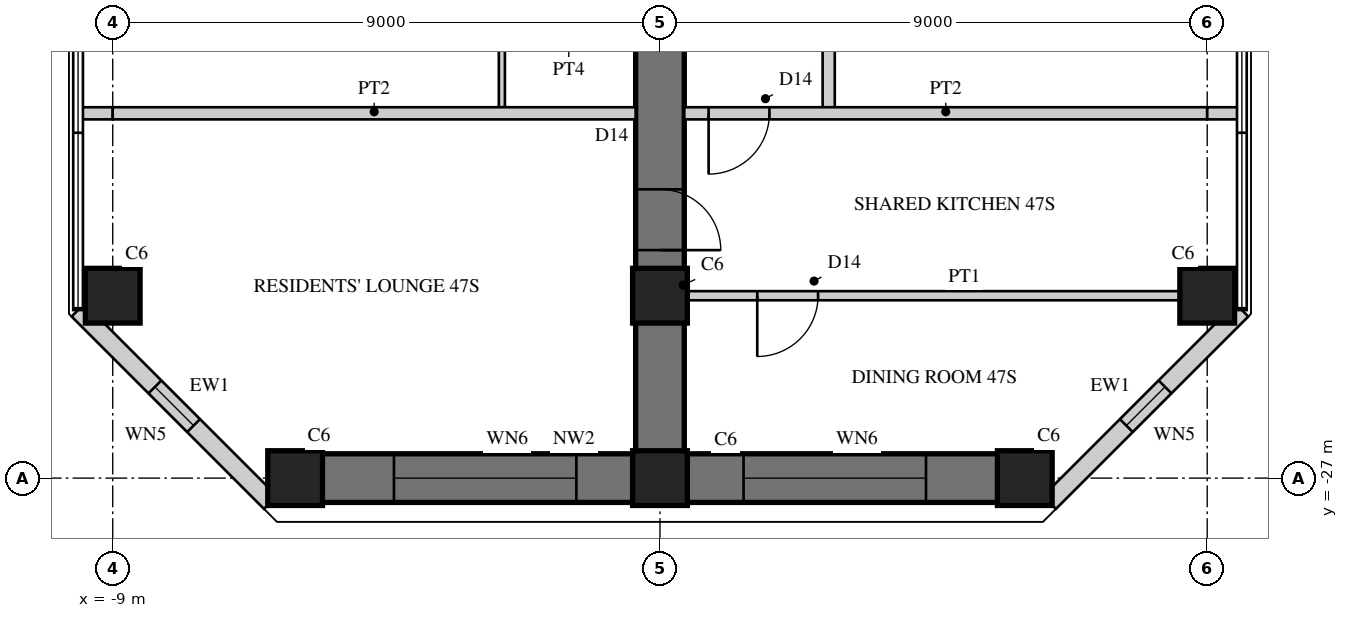
"""IFC4 building model, lengths in metres.
Left out: names, types, materials, properties, quantities, classifications, styles, units other than length and angle.
Written with IfcOpenShell. Run it as: python <this file> out.ifc"""

import sys

from ifc_helpers import new_model, si_unit, direction, frame, frame_2d, origin, origin_2d, place, context, subcontext, project, spatial, rectangle, hollow_rectangle, extrude, element, fill, save


model = new_model("IFC4")
c1 = context("Model", 3, precision=1e-05, world=origin(), true_north=direction((0.0, 1.0)))
c2 = subcontext(c1, "Body", "Model", "MODEL_VIEW")
j1 = project(units=[si_unit("LENGTHUNIT", "METRE"), si_unit("PLANEANGLEUNIT", "RADIAN")], contexts=[c1])
p1 = place(None, origin())
s1 = spatial("IfcSite", under=j1, at=p1, CompositionType="ELEMENT")
p2 = place(p1, origin())
s2 = spatial("IfcBuilding", under=s1, at=p2, CompositionType="ELEMENT")
p3 = place(p2, frame((0.0, 0.0, 189.9)))
s3 = spatial("IfcBuildingStorey", under=s2, at=p3, CompositionType="ELEMENT", Elevation=189.9)
p4 = place(p3, frame((0.0, -9.0, 0.0), z_axis=(0.0, 0.0, 1.0), x_axis=(0.0, -1.0, 0.0)))
e1 = element("IfcWall", 1, at=p4, inside=s3, PredefinedType="SHEAR", context=c2, shape_type="SweptSolid", body=[
    extrude(rectangle(XDim=18.0, YDim=0.8, at=frame_2d((9.0, 0.0))), origin(), (0.0, 0.0, 1.0), 3.4),
])
p5 = place(p4, frame((3.95, 0.0, 0.0)))
e2 = element("IfcOpeningElement", 2, at=p5, cuts=e1, PredefinedType="OPENING", context=c2, shape_type="SweptSolid", body=[
    extrude(rectangle(XDim=1.0, YDim=2.15, at=frame_2d((0.5, 1.075))), frame((0.0, 0.41, 0.0), z_axis=(0.0, -1.0, 0.0), x_axis=(1.0, 0.0, 0.0)), (0.0, 0.0, 1.0), 0.82),
])
p6 = place(p4, frame((6.6, 0.0, 0.0)))
e3 = element("IfcOpeningElement", 3, at=p6, cuts=e1, PredefinedType="OPENING", context=c2, shape_type="SweptSolid", body=[
    extrude(rectangle(XDim=1.0, YDim=2.15, at=frame_2d((0.5, 1.075))), frame((0.0, 0.41, 0.0), z_axis=(0.0, -1.0, 0.0), x_axis=(1.0, 0.0, 0.0)), (0.0, 0.0, 1.0), 0.82),
])
p7 = place(p4, frame((13.25, 0.0, 0.0)))
e4 = element("IfcOpeningElement", 4, at=p7, cuts=e1, PredefinedType="OPENING", context=c2, shape_type="SweptSolid", body=[
    extrude(rectangle(XDim=1.0, YDim=2.2, at=frame_2d((0.5, 1.1))), frame((0.0, 0.41, 0.0), z_axis=(0.0, -1.0, 0.0), x_axis=(1.0, 0.0, 0.0)), (0.0, 0.0, 1.0), 0.82),
])
p8 = place(p3, frame((-6.0, -27.0, 0.0), z_axis=(0.0, 0.0, 1.0), x_axis=(1.0, 0.0, 0.0)))
e5 = element("IfcWall", 5, at=p8, inside=s3, PredefinedType="SHEAR", context=c2, shape_type="SweptSolid", body=[
    extrude(rectangle(XDim=12.0, YDim=0.8, at=frame_2d((6.0, 0.0))), origin(), (0.0, 0.0, 1.0), 3.4),
])
p9 = place(p8, frame((1.625, 0.0, 0.6)))
e6 = element("IfcOpeningElement", 6, at=p9, cuts=e5, PredefinedType="OPENING", context=c2, shape_type="SweptSolid", body=[
    extrude(rectangle(XDim=3.0, YDim=2.4, at=frame_2d((1.5, 1.2))), frame((0.0, 0.41, 0.0), z_axis=(0.0, -1.0, 0.0), x_axis=(1.0, 0.0, 0.0)), (0.0, 0.0, 1.0), 0.82),
])
p10 = place(p8, frame((7.375, 0.0, 0.6)))
e7 = element("IfcOpeningElement", 7, at=p10, cuts=e5, PredefinedType="OPENING", context=c2, shape_type="SweptSolid", body=[
    extrude(rectangle(XDim=3.0, YDim=2.4, at=frame_2d((1.5, 1.2))), frame((0.0, 0.41, 0.0), z_axis=(0.0, -1.0, 0.0), x_axis=(1.0, 0.0, 0.0)), (0.0, 0.0, 1.0), 0.82),
])
for number, where, z_axis, x_axis in (
    (8, (-9.0, -24.0, 0.0), (0.0, 0.0, 1.0), (1.0, 0.0, 0.0)),
    (9, (9.0, -24.0, 0.0), (0.0, 0.0, 1.0), (1.0, 0.0, 0.0)),
    (10, (-6.0, -27.0, 0.0), (0.0, 0.0, 1.0), (1.0, 0.0, 0.0)),
    (11, (0.0, -27.0, 0.0), (0.0, 0.0, 1.0), (1.0, 0.0, 0.0)),
    (12, (6.0, -27.0, 0.0), (0.0, 0.0, 1.0), (1.0, 0.0, 0.0)),
    (13, (0.0, -24.0, 0.0), (0.0, 0.0, 1.0), (1.0, 0.0, 0.0)),
):
    element("IfcColumn", number, at=place(p3, frame(where, z_axis=z_axis, x_axis=x_axis)), inside=s3, PredefinedType="COLUMN", context=c2, shape_type="SweptSolid", body=[
        extrude(rectangle(XDim=0.9, YDim=0.9, at=origin_2d()), origin(), (0.0, 0.0, 1.0), 3.4),
    ])
p11 = place(p3, frame((-9.57, -24.236, 0.0), z_axis=(0.0, 0.0, 1.0), x_axis=(0.707134062067, -0.707079499254, 0.0)))
e14 = element("IfcWall", 14, at=p11, inside=s3, PredefinedType="SOLIDWALL", context=c2, shape_type="SweptSolid", body=[
    extrude(rectangle(XDim=4.475, YDim=0.3, at=frame_2d((2.237, 0.0))), origin(), (0.0, 0.0, 1.0), 3.22),
])
p12 = place(p11, frame((1.787, 0.0, 0.3)))
e15 = element("IfcOpeningElement", 15, at=p12, cuts=e14, PredefinedType="OPENING", context=c2, shape_type="SweptSolid", body=[
    extrude(rectangle(XDim=0.9, YDim=2.4, at=frame_2d((0.45, 1.2))), frame((0.0, 0.16, 0.0), z_axis=(0.0, -1.0, 0.0), x_axis=(1.0, 0.0, 0.0)), (0.0, 0.0, 1.0), 0.32),
])
p13 = place(p3, frame((6.406, -27.4, 0.0), z_axis=(0.0, 0.0, 1.0), x_axis=(0.707134062067, 0.707079499254, 0.0)))
e16 = element("IfcWall", 16, at=p13, inside=s3, PredefinedType="SOLIDWALL", context=c2, shape_type="SweptSolid", body=[
    extrude(rectangle(XDim=4.475, YDim=0.3, at=frame_2d((2.237, 0.0))), origin(), (0.0, 0.0, 1.0), 3.22),
])
p14 = place(p13, frame((1.787, 0.0, 0.3)))
e17 = element("IfcOpeningElement", 17, at=p14, cuts=e16, PredefinedType="OPENING", context=c2, shape_type="SweptSolid", body=[
    extrude(rectangle(XDim=0.9, YDim=2.4, at=frame_2d((0.45, 1.2))), frame((0.0, 0.16, 0.0), z_axis=(0.0, -1.0, 0.0), x_axis=(1.0, 0.0, 0.0)), (0.0, 0.0, 1.0), 0.32),
])
p15 = place(p3, frame((-2.6, -18.45, 0.0), z_axis=(0.0, 0.0, 1.0), x_axis=(0.0, -1.0, 0.0)))
e18 = element("IfcWall", 18, at=p15, inside=s3, PredefinedType="PARTITIONING", context=c2, shape_type="SweptSolid", body=[
    extrude(rectangle(XDim=2.45, YDim=0.1, at=frame_2d((1.225, 0.0))), origin(), (0.0, 0.0, 1.0), 3.22),
])
p16 = place(p3, frame((2.775, -9.55, 0.0), z_axis=(0.0, 0.0, 1.0), x_axis=(0.0, -1.0, 0.0)))
e19 = element("IfcWall", 19, at=p16, inside=s3, PredefinedType="SOLIDWALL", context=c2, shape_type="SweptSolid", body=[
    extrude(rectangle(XDim=11.45, YDim=0.2, at=frame_2d((5.725, 0.0))), origin(), (0.0, 0.0, 1.0), 3.22),
])
p17 = place(p16, frame((3.4, 0.0, 0.0)))
e20 = element("IfcOpeningElement", 20, at=p17, cuts=e19, PredefinedType="OPENING", context=c2, shape_type="SweptSolid", body=[
    extrude(rectangle(XDim=1.0, YDim=2.15, at=frame_2d((0.5, 1.075))), frame((0.0, 0.11, 0.0), z_axis=(0.0, -1.0, 0.0), x_axis=(1.0, 0.0, 0.0)), (0.0, 0.0, 1.0), 0.22),
])
p18 = place(p16, frame((6.65, 0.0, 0.0)))
e21 = element("IfcOpeningElement", 21, at=p18, cuts=e19, PredefinedType="OPENING", context=c2, shape_type="SweptSolid", body=[
    extrude(rectangle(XDim=1.0, YDim=2.2, at=frame_2d((0.5, 1.1))), frame((0.0, 0.11, 0.0), z_axis=(0.0, -1.0, 0.0), x_axis=(1.0, 0.0, 0.0)), (0.0, 0.0, 1.0), 0.22),
])
p19 = place(p3, frame((0.4, -24.0, 0.0), z_axis=(0.0, 0.0, 1.0), x_axis=(1.0, 0.0, 0.0)))
e22 = element("IfcWall", 22, at=p19, inside=s3, PredefinedType="PARTITIONING", context=c2, shape_type="SweptSolid", body=[
    extrude(rectangle(XDim=8.15, YDim=0.15, at=frame_2d((4.075, 0.0))), origin(), (0.0, 0.0, 1.0), 2.47),
])
p20 = place(p19, frame((1.2, 0.0, 0.0)))
e23 = element("IfcOpeningElement", 23, at=p20, cuts=e22, PredefinedType="OPENING", context=c2, shape_type="SweptSolid", body=[
    extrude(rectangle(XDim=1.0, YDim=2.2, at=frame_2d((0.5, 1.1))), frame((0.0, 0.085, 0.0), z_axis=(0.0, -1.0, 0.0), x_axis=(1.0, 0.0, 0.0)), (0.0, 0.0, 1.0), 0.17),
])
p21 = place(p3, frame((-9.53, -21.0, 0.0), z_axis=(0.0, 0.0, 1.0), x_axis=(1.0, 0.0, 0.0)))
e24 = element("IfcWall", 24, at=p21, inside=s3, PredefinedType="SOLIDWALL", context=c2, shape_type="SweptSolid", body=[
    extrude(rectangle(XDim=0.53, YDim=0.2, at=frame_2d((0.265, 0.0))), origin(), (0.0, 0.0, 1.0), 3.22),
])
p22 = place(p3, frame((-9.0, -21.0, 0.0), z_axis=(0.0, 0.0, 1.0), x_axis=(1.0, 0.0, 0.0)))
e25 = element("IfcWall", 25, at=p22, inside=s3, PredefinedType="SOLIDWALL", context=c2, shape_type="SweptSolid", body=[
    extrude(rectangle(XDim=8.6, YDim=0.2, at=frame_2d((4.3, 0.0))), origin(), (0.0, 0.0, 1.0), 2.62),
])
p23 = place(p3, frame((0.4, -21.0, 0.0), z_axis=(0.0, 0.0, 1.0), x_axis=(1.0, 0.0, 0.0)))
e26 = element("IfcWall", 26, at=p23, inside=s3, PredefinedType="SOLIDWALL", context=c2, shape_type="SweptSolid", body=[
    extrude(rectangle(XDim=8.6, YDim=0.2, at=frame_2d((4.3, 0.0))), origin(), (0.0, 0.0, 1.0), 2.62),
])
p24 = place(p23, frame((0.4, 0.0, 0.0)))
e27 = element("IfcOpeningElement", 27, at=p24, cuts=e26, PredefinedType="OPENING", context=c2, shape_type="SweptSolid", body=[
    extrude(rectangle(XDim=1.0, YDim=2.2, at=frame_2d((0.5, 1.1))), frame((0.0, 0.11, 0.0), z_axis=(0.0, -1.0, 0.0), x_axis=(1.0, 0.0, 0.0)), (0.0, 0.0, 1.0), 0.22),
])
p25 = place(p3, frame((9.0, -21.0, 0.0), z_axis=(0.0, 0.0, 1.0), x_axis=(1.0, 0.0, 0.0)))
e28 = element("IfcWall", 28, at=p25, inside=s3, PredefinedType="SOLIDWALL", context=c2, shape_type="SweptSolid", body=[
    extrude(rectangle(XDim=0.53, YDim=0.2, at=frame_2d((0.265, 0.0))), origin(), (0.0, 0.0, 1.0), 3.22),
])
p26 = place(p12, origin())
e29 = element("IfcWindow", 29, at=p26, inside=s3, PartitioningType="SINGLE_PANEL", PredefinedType="WINDOW", context=c2, shape_type="SweptSolid", body=[
    extrude(hollow_rectangle(XDim=0.9, YDim=2.4, WallThickness=0.06, at=frame_2d((0.45, 1.2))), frame((0.0, 0.03, 0.0), z_axis=(0.0, -1.0, 0.0), x_axis=(1.0, 0.0, 0.0)), (0.0, 0.0, 1.0), 0.06),
    extrude(rectangle(XDim=0.779, YDim=2.279, at=frame_2d((0.45, 1.2))), frame((0.0, 0.03, 0.0), z_axis=(0.0, -1.0, 0.0), x_axis=(1.0, 0.0, 0.0)), (0.0, 0.0, 1.0), 0.06),
])
fill(e15, e29)
p27 = place(p9, origin())
e30 = element("IfcWindow", 30, at=p27, inside=s3, PartitioningType="SINGLE_PANEL", PredefinedType="WINDOW", context=c2, shape_type="SweptSolid", body=[
    extrude(hollow_rectangle(XDim=3.0, YDim=2.4, WallThickness=0.06, at=frame_2d((1.5, 1.2))), frame((0.0, 0.03, 0.0), z_axis=(0.0, -1.0, 0.0), x_axis=(1.0, 0.0, 0.0)), (0.0, 0.0, 1.0), 0.06),
    extrude(rectangle(XDim=2.879, YDim=2.279, at=frame_2d((1.5, 1.2))), frame((0.0, 0.03, 0.0), z_axis=(0.0, -1.0, 0.0), x_axis=(1.0, 0.0, 0.0)), (0.0, 0.0, 1.0), 0.06),
])
fill(e6, e30)
p28 = place(p10, origin())
e31 = element("IfcWindow", 31, at=p28, inside=s3, PartitioningType="SINGLE_PANEL", PredefinedType="WINDOW", context=c2, shape_type="SweptSolid", body=[
    extrude(hollow_rectangle(XDim=3.0, YDim=2.4, WallThickness=0.06, at=frame_2d((1.5, 1.2))), frame((0.0, 0.03, 0.0), z_axis=(0.0, -1.0, 0.0), x_axis=(1.0, 0.0, 0.0)), (0.0, 0.0, 1.0), 0.06),
    extrude(rectangle(XDim=2.879, YDim=2.279, at=frame_2d((1.5, 1.2))), frame((0.0, 0.03, 0.0), z_axis=(0.0, -1.0, 0.0), x_axis=(1.0, 0.0, 0.0)), (0.0, 0.0, 1.0), 0.06),
])
fill(e7, e31)
p29 = place(p14, origin())
e32 = element("IfcWindow", 32, at=p29, inside=s3, PartitioningType="SINGLE_PANEL", PredefinedType="WINDOW", context=c2, shape_type="SweptSolid", body=[
    extrude(hollow_rectangle(XDim=0.9, YDim=2.4, WallThickness=0.06, at=frame_2d((0.45, 1.2))), frame((0.0, 0.03, 0.0), z_axis=(0.0, -1.0, 0.0), x_axis=(1.0, 0.0, 0.0)), (0.0, 0.0, 1.0), 0.06),
    extrude(rectangle(XDim=0.779, YDim=2.279, at=frame_2d((0.45, 1.2))), frame((0.0, 0.03, 0.0), z_axis=(0.0, -1.0, 0.0), x_axis=(1.0, 0.0, 0.0)), (0.0, 0.0, 1.0), 0.06),
])
fill(e17, e32)
p30 = place(p20, frame((1.0, 0.0, 0.0), z_axis=(0.0, 0.0, 1.0), x_axis=(-1.0, 0.0, 0.0)))
e33 = element("IfcDoor", 33, at=p30, inside=s3, OperationType="SINGLE_SWING_RIGHT", PredefinedType="DOOR", context=c2, shape_type="SweptSolid", body=[
    extrude(rectangle(XDim=1.0, YDim=2.2, at=frame_2d((0.5, 1.1))), frame((0.0, 0.025, 0.0), z_axis=(0.0, -1.0, 0.0), x_axis=(1.0, 0.0, 0.0)), (0.0, 0.0, 1.0), 0.05),
])
fill(e23, e33)
p31 = place(p24, frame((1.0, 0.0, 0.0), z_axis=(0.0, 0.0, 1.0), x_axis=(-1.0, 0.0, 0.0)))
e34 = element("IfcDoor", 34, at=p31, inside=s3, OperationType="SINGLE_SWING_RIGHT", PredefinedType="DOOR", context=c2, shape_type="SweptSolid", body=[
    extrude(rectangle(XDim=1.0, YDim=2.2, at=frame_2d((0.5, 1.1))), frame((0.0, 0.025, 0.0), z_axis=(0.0, -1.0, 0.0), x_axis=(1.0, 0.0, 0.0)), (0.0, 0.0, 1.0), 0.05),
])
fill(e27, e34)
p32 = place(p7, origin())
e35 = element("IfcDoor", 35, at=p32, inside=s3, OperationType="SINGLE_SWING_RIGHT", PredefinedType="DOOR", context=c2, shape_type="SweptSolid", body=[
    extrude(rectangle(XDim=1.0, YDim=2.2, at=frame_2d((0.5, 1.1))), frame((0.0, 0.025, 0.0), z_axis=(0.0, -1.0, 0.0), x_axis=(1.0, 0.0, 0.0)), (0.0, 0.0, 1.0), 0.05),
])
fill(e4, e35)
save(model, sys.argv[1])
